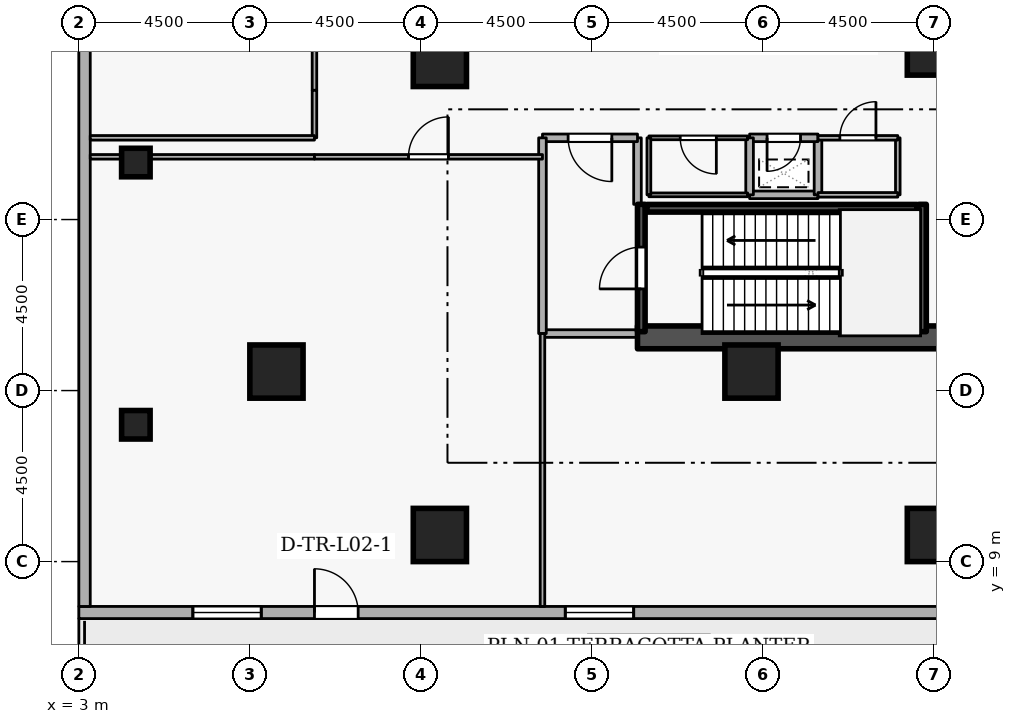
"""IFC4 building model, lengths in metres.
Left out: names, types, materials, properties, quantities, classifications, styles, units other than length and angle.
Written with IfcOpenShell. Run it as: python <this file> out.ifc"""

import sys

from ifc_helpers import new_model, si_unit, direction, frame, frame_2d, origin, origin_2d, place, context, subcontext, project, spatial, rectangle, extrude, element, fill, save


model = new_model("IFC4")
c1 = context("Model", 3, precision=1e-05, world=origin(), true_north=direction((0.0, 1.0)))
c2 = subcontext(c1, "Body", "Model", "MODEL_VIEW")
j1 = project(units=[si_unit("LENGTHUNIT", "METRE"), si_unit("PLANEANGLEUNIT", "RADIAN")], contexts=[c1])
p1 = place(None, origin())
s1 = spatial("IfcSite", under=j1, at=p1, CompositionType="ELEMENT")
p2 = place(p1, origin())
s2 = spatial("IfcBuilding", under=s1, at=p2, CompositionType="ELEMENT")
p3 = place(p2, frame((0.0, 0.0, 9.6)))
s3 = spatial("IfcBuildingStorey", under=s2, at=p3, CompositionType="ELEMENT", Elevation=9.6)
p4 = place(p3, frame((17.7, 14.9, 0.0), z_axis=(0.0, 0.0, 1.0), x_axis=(1.0, 0.0, 0.0)))
e1 = element("IfcWall", 1, at=p4, inside=s3, PredefinedType="SHEAR", context=c2, shape_type="SweptSolid", body=[
    extrude(rectangle(XDim=15.6, YDim=0.6, at=frame_2d((7.8, 0.0))), origin(), (0.0, 0.0, 1.0), 4.5),
])
for number, where, z_axis, x_axis in (
    (2, (12.5, 9.7, 0.0), (0.0, 0.0, 1.0), (1.0, 0.0, 0.0)),
    (3, (25.5, 9.7, 0.0), (0.0, 0.0, 1.0), (1.0, 0.0, 0.0)),
    (4, (8.2, 14.0, 0.0), (0.0, 0.0, 1.0), (1.0, 0.0, 0.0)),
    (5, (12.5, 22.2, 0.0), (0.0, 0.0, 1.0), (1.0, 0.0, 0.0)),
    (6, (20.7, 14.0, 0.0), (0.0, 0.0, 1.0), (1.0, 0.0, 0.0)),
    (7, (25.5, 22.5, 0.0), (0.0, 0.0, 1.0), (1.0, 0.0, 0.0)),
):
    element("IfcColumn", number, at=place(p3, frame(where, z_axis=z_axis, x_axis=x_axis)), inside=s3, PredefinedType="COLUMN", context=c2, shape_type="SweptSolid", body=[
        extrude(rectangle(XDim=1.4, YDim=1.4, at=origin_2d()), origin(), (0.0, 0.0, 1.0), 4.5),
    ])
for number, where, z_axis, x_axis in (
    (8, (4.5, 12.6, 0.0), (0.0, 0.0, 1.0), (1.0, 0.0, 0.0)),
    (9, (4.5, 19.5, 0.0), (0.0, 0.0, 1.0), (1.0, 0.0, 0.0)),
):
    element("IfcColumn", number, at=place(p3, frame(where, z_axis=z_axis, x_axis=x_axis)), inside=s3, PredefinedType="COLUMN", context=c2, shape_type="SweptSolid", body=[
        extrude(rectangle(XDim=0.75, YDim=0.75, at=origin_2d()), origin(), (0.0, 0.0, 1.0), 4.5),
    ])
p5 = place(p3, frame((3.0, 7.66, 0.0), z_axis=(0.0, 0.0, 1.0), x_axis=(1.0, 0.0, 0.0)))
e10 = element("IfcWall", 10, at=p5, inside=s3, PredefinedType="STANDARD", context=c2, shape_type="SweptSolid", body=[
    extrude(rectangle(XDim=39.4, YDim=0.32, at=frame_2d((19.7, 0.0))), origin(), (0.0, 0.0, 1.0), 3.56),
])
p6 = place(p5, frame((6.2, 0.0, 0.0)))
e11 = element("IfcOpeningElement", 11, at=p6, cuts=e10, PredefinedType="OPENING", context=c2, shape_type="SweptSolid", body=[
    extrude(rectangle(XDim=1.15, YDim=2.1, at=frame_2d((0.575, 1.05))), frame((0.0, 0.17, 0.0), z_axis=(0.0, -1.0, 0.0), x_axis=(1.0, 0.0, 0.0)), (0.0, 0.0, 1.0), 0.34),
])
p7 = place(p5, frame((3.0, 0.0, 0.78)))
e12 = element("IfcOpeningElement", 12, at=p7, cuts=e10, PredefinedType="OPENING", context=c2, shape_type="SweptSolid", body=[
    extrude(rectangle(XDim=1.8, YDim=2.15, at=frame_2d((0.9, 1.075))), frame((0.0, 0.17, 0.0), z_axis=(0.0, -1.0, 0.0), x_axis=(1.0, 0.0, 0.0)), (0.0, 0.0, 1.0), 0.34),
])
p8 = place(p5, frame((12.8, 0.0, 0.78)))
e13 = element("IfcOpeningElement", 13, at=p8, cuts=e10, PredefinedType="OPENING", context=c2, shape_type="SweptSolid", body=[
    extrude(rectangle(XDim=1.8, YDim=2.15, at=frame_2d((0.9, 1.075))), frame((0.0, 0.17, 0.0), z_axis=(0.0, -1.0, 0.0), x_axis=(1.0, 0.0, 0.0)), (0.0, 0.0, 1.0), 0.34),
])
p9 = place(p5, frame((32.8, 0.0, 0.78)))
e14 = element("IfcOpeningElement", 14, at=p9, cuts=e10, PredefinedType="OPENING", context=c2, shape_type="SweptSolid", body=[
    extrude(rectangle(XDim=1.8, YDim=2.15, at=frame_2d((0.9, 1.075))), frame((0.0, 0.17, 0.0), z_axis=(0.0, -1.0, 0.0), x_axis=(1.0, 0.0, 0.0)), (0.0, 0.0, 1.0), 0.34),
])
p10 = place(p3, frame((3.15, 49.18, 0.0), z_axis=(0.0, 0.0, 1.0), x_axis=(0.0, -1.0, 0.0)))
e15 = element("IfcWall", 15, at=p10, inside=s3, PredefinedType="STANDARD", context=c2, shape_type="SweptSolid", body=[
    extrude(rectangle(XDim=41.36, YDim=0.3, at=frame_2d((20.68, 0.0))), origin(), (0.0, 0.0, 1.0), 3.56),
])
p11 = place(p3, frame((17.8, 15.05, 0.0), z_axis=(0.0, 0.0, 1.0), x_axis=(0.0, 1.0, 0.0)))
e16 = element("IfcWall", 16, at=p11, inside=s3, PredefinedType="SHEAR", context=c2, shape_type="SweptSolid", body=[
    extrude(rectangle(XDim=3.35, YDim=0.2, at=frame_2d((1.675, 0.0))), origin(), (0.0, 0.0, 1.0), 4.5),
])
p12 = place(p11, frame((1.125, 0.0, 0.0)))
e17 = element("IfcOpeningElement", 17, at=p12, cuts=e16, PredefinedType="OPENING", context=c2, shape_type="SweptSolid", body=[
    extrude(rectangle(XDim=1.1, YDim=2.1, at=frame_2d((0.55, 1.05))), frame((0.0, 0.11, 0.0), z_axis=(0.0, -1.0, 0.0), x_axis=(1.0, 0.0, 0.0)), (0.0, 0.0, 1.0), 0.22),
])
p13 = place(p3, frame((25.2, 18.4, 0.0), z_axis=(0.0, 0.0, 1.0), x_axis=(0.0, -1.0, 0.0)))
e18 = element("IfcWall", 18, at=p13, inside=s3, PredefinedType="SHEAR", context=c2, shape_type="SweptSolid", body=[
    extrude(rectangle(XDim=3.35, YDim=0.2, at=frame_2d((1.675, 0.0))), origin(), (0.0, 0.0, 1.0), 4.5),
])
p14 = place(p3, frame((25.05, 18.297, 0.0), z_axis=(0.0, 0.0, 1.0), x_axis=(-1.0, 0.0, 0.0)))
e19 = element("IfcWall", 19, at=p14, inside=s3, PredefinedType="SHEAR", context=c2, shape_type="SweptSolid", body=[
    extrude(rectangle(XDim=7.1, YDim=0.2, at=frame_2d((3.55, 0.0))), origin(), (0.0, 0.0, 1.0), 4.5),
])
p15 = place(p3, frame((15.2, 15.0, 0.0), z_axis=(0.0, 0.0, 1.0), x_axis=(1.0, 0.0, 0.0)))
e20 = element("IfcWall", 20, at=p15, inside=s3, PredefinedType="STANDARD", context=c2, shape_type="SweptSolid", body=[
    extrude(rectangle(XDim=2.5, YDim=0.2, at=frame_2d((1.25, 0.0))), origin(), (0.0, 0.0, 1.0), 4.16),
])
p16 = place(p3, frame((17.7, 18.4, 0.0), z_axis=(0.0, 0.0, 1.0), x_axis=(0.0, 1.0, 0.0)))
e21 = element("IfcWall", 21, at=p16, inside=s3, PredefinedType="STANDARD", context=c2, shape_type="SweptSolid", body=[
    extrude(rectangle(XDim=1.75, YDim=0.2, at=frame_2d((0.875, 0.0))), origin(), (0.0, 0.0, 1.0), 3.365),
])
p17 = place(p3, frame((17.7, 20.15, 0.0), z_axis=(0.0, 0.0, 1.0), x_axis=(-1.0, 0.0, 0.0)))
e22 = element("IfcWall", 22, at=p17, inside=s3, PredefinedType="STANDARD", context=c2, shape_type="SweptSolid", body=[
    extrude(rectangle(XDim=2.5, YDim=0.2, at=frame_2d((1.25, 0.0))), origin(), (0.0, 0.0, 1.0), 4.16),
])
p18 = place(p17, frame((0.675, 0.0, 0.0)))
e23 = element("IfcOpeningElement", 23, at=p18, cuts=e22, PredefinedType="OPENING", context=c2, shape_type="SweptSolid", body=[
    extrude(rectangle(XDim=1.15, YDim=2.1, at=frame_2d((0.575, 1.05))), frame((0.0, 0.11, 0.0), z_axis=(0.0, -1.0, 0.0), x_axis=(1.0, 0.0, 0.0)), (0.0, 0.0, 1.0), 0.22),
])
p19 = place(p3, frame((15.2, 20.15, 0.0), z_axis=(0.0, 0.0, 1.0), x_axis=(0.0, -1.0, 0.0)))
e24 = element("IfcWall", 24, at=p19, inside=s3, PredefinedType="STANDARD", context=c2, shape_type="SweptSolid", body=[
    extrude(rectangle(XDim=5.15, YDim=0.2, at=frame_2d((2.575, 0.0))), origin(), (0.0, 0.0, 1.0), 4.16),
])
p20 = place(p3, frame((20.65, 18.65, 0.0), z_axis=(0.0, 0.0, 1.0), x_axis=(1.0, 0.0, 0.0)))
e25 = element("IfcWall", 25, at=p20, inside=s3, PredefinedType="STANDARD", context=c2, shape_type="SweptSolid", body=[
    extrude(rectangle(XDim=1.8, YDim=0.2, at=frame_2d((0.9, 0.0))), origin(), (0.0, 0.0, 1.0), 4.16),
])
p21 = place(p3, frame((22.45, 18.65, 0.0), z_axis=(0.0, 0.0, 1.0), x_axis=(0.0, 1.0, 0.0)))
e26 = element("IfcWall", 26, at=p21, inside=s3, PredefinedType="STANDARD", context=c2, shape_type="SweptSolid", body=[
    extrude(rectangle(XDim=1.5, YDim=0.2, at=frame_2d((0.75, 0.0))), origin(), (0.0, 0.0, 1.0), 4.16),
])
p22 = place(p3, frame((22.45, 20.15, 0.0), z_axis=(0.0, 0.0, 1.0), x_axis=(-1.0, 0.0, 0.0)))
e27 = element("IfcWall", 27, at=p22, inside=s3, PredefinedType="STANDARD", context=c2, shape_type="SweptSolid", body=[
    extrude(rectangle(XDim=1.8, YDim=0.2, at=frame_2d((0.9, 0.0))), origin(), (0.0, 0.0, 1.0), 4.16),
])
p23 = place(p22, frame((0.46, 0.0, 0.0)))
e28 = element("IfcOpeningElement", 28, at=p23, cuts=e27, PredefinedType="OPENING", context=c2, shape_type="SweptSolid", body=[
    extrude(rectangle(XDim=0.88, YDim=2.04, at=frame_2d((0.44, 1.02))), frame((0.0, 0.11, 0.0), z_axis=(0.0, -1.0, 0.0), x_axis=(1.0, 0.0, 0.0)), (0.0, 0.0, 1.0), 0.22),
])
p24 = place(p3, frame((20.65, 20.15, 0.0), z_axis=(0.0, 0.0, 1.0), x_axis=(0.0, -1.0, 0.0)))
e29 = element("IfcWall", 29, at=p24, inside=s3, PredefinedType="STANDARD", context=c2, shape_type="SweptSolid", body=[
    extrude(rectangle(XDim=1.5, YDim=0.2, at=frame_2d((0.75, 0.0))), origin(), (0.0, 0.0, 1.0), 4.16),
])
p25 = place(p3, frame((18.0, 18.65, 0.0), z_axis=(0.0, 0.0, 1.0), x_axis=(1.0, 0.0, 0.0)))
e30 = element("IfcWall", 30, at=p25, inside=s3, PredefinedType="PARTITIONING", context=c2, shape_type="SweptSolid", body=[
    extrude(rectangle(XDim=2.6, YDim=0.1, at=frame_2d((1.3, 0.0))), origin(), (0.0, 0.0, 1.0), 4.16),
])
p26 = place(p3, frame((20.6, 20.15, 0.0), z_axis=(0.0, 0.0, 1.0), x_axis=(-1.0, 0.0, 0.0)))
e31 = element("IfcWall", 31, at=p26, inside=s3, PredefinedType="PARTITIONING", context=c2, shape_type="SweptSolid", body=[
    extrude(rectangle(XDim=2.6, YDim=0.1, at=frame_2d((1.3, 0.0))), origin(), (0.0, 0.0, 1.0), 4.16),
])
p27 = place(p26, frame((0.825, 0.0, 0.0)))
e32 = element("IfcOpeningElement", 32, at=p27, cuts=e31, PredefinedType="OPENING", context=c2, shape_type="SweptSolid", body=[
    extrude(rectangle(XDim=0.95, YDim=2.1, at=frame_2d((0.475, 1.05))), frame((0.0, 0.06, 0.0), z_axis=(0.0, -1.0, 0.0), x_axis=(1.0, 0.0, 0.0)), (0.0, 0.0, 1.0), 0.12),
])
p28 = place(p3, frame((18.0, 20.15, 0.0), z_axis=(0.0, 0.0, 1.0), x_axis=(0.0, -1.0, 0.0)))
e33 = element("IfcWall", 33, at=p28, inside=s3, PredefinedType="PARTITIONING", context=c2, shape_type="SweptSolid", body=[
    extrude(rectangle(XDim=1.5, YDim=0.1, at=frame_2d((0.75, 0.0))), origin(), (0.0, 0.0, 1.0), 3.365),
])
p29 = place(p3, frame((24.55, 20.15, 0.0), z_axis=(0.0, 0.0, 1.0), x_axis=(0.0, -1.0, 0.0)))
e34 = element("IfcWall", 34, at=p29, inside=s3, PredefinedType="PARTITIONING", context=c2, shape_type="SweptSolid", body=[
    extrude(rectangle(XDim=1.5, YDim=0.12, at=frame_2d((0.75, 0.0))), origin(), (0.0, 0.0, 1.0), 4.16),
])
p30 = place(p3, frame((24.55, 18.65, 0.0), z_axis=(0.0, 0.0, 1.0), x_axis=(-1.0, 0.0, 0.0)))
e35 = element("IfcWall", 35, at=p30, inside=s3, PredefinedType="PARTITIONING", context=c2, shape_type="SweptSolid", body=[
    extrude(rectangle(XDim=2.1, YDim=0.12, at=frame_2d((1.05, 0.0))), origin(), (0.0, 0.0, 1.0), 4.16),
])
p31 = place(p3, frame((22.45, 20.15, 0.0), z_axis=(0.0, 0.0, 1.0), x_axis=(1.0, 0.0, 0.0)))
e36 = element("IfcWall", 36, at=p31, inside=s3, PredefinedType="PARTITIONING", context=c2, shape_type="SweptSolid", body=[
    extrude(rectangle(XDim=2.1, YDim=0.12, at=frame_2d((1.05, 0.0))), origin(), (0.0, 0.0, 1.0), 4.16),
])
p32 = place(p31, frame((0.575, 0.0, 0.0)))
e37 = element("IfcOpeningElement", 37, at=p32, cuts=e36, PredefinedType="OPENING", context=c2, shape_type="SweptSolid", body=[
    extrude(rectangle(XDim=0.95, YDim=2.1, at=frame_2d((0.475, 1.05))), frame((0.0, 0.07, 0.0), z_axis=(0.0, -1.0, 0.0), x_axis=(1.0, 0.0, 0.0)), (0.0, 0.0, 1.0), 0.14),
])
p33 = place(p3, frame((3.3, 19.65, 0.0), z_axis=(0.0, 0.0, 1.0), x_axis=(1.0, 0.0, 0.0)))
e38 = element("IfcWall", 38, at=p33, inside=s3, PredefinedType="PARTITIONING", context=c2, shape_type="SweptSolid", body=[
    extrude(rectangle(XDim=5.9, YDim=0.12, at=frame_2d((2.95, 0.0))), origin(), (0.0, 0.0, 1.0), 4.16),
])
p34 = place(p3, frame((9.2, 19.65, 0.0), z_axis=(0.0, 0.0, 1.0), x_axis=(1.0, 0.0, 0.0)))
e39 = element("IfcWall", 39, at=p34, inside=s3, PredefinedType="PARTITIONING", context=c2, shape_type="SweptSolid", body=[
    extrude(rectangle(XDim=6.0, YDim=0.12, at=frame_2d((3.0, 0.0))), origin(), (0.0, 0.0, 1.0), 4.16),
])
p35 = place(p34, frame((2.475, 0.0, 0.0)))
e40 = element("IfcOpeningElement", 40, at=p35, cuts=e39, PredefinedType="OPENING", context=c2, shape_type="SweptSolid", body=[
    extrude(rectangle(XDim=1.05, YDim=2.1, at=frame_2d((0.525, 1.05))), frame((0.0, 0.07, 0.0), z_axis=(0.0, -1.0, 0.0), x_axis=(1.0, 0.0, 0.0)), (0.0, 0.0, 1.0), 0.14),
])
p36 = place(p3, frame((15.2, 15.0, 0.0), z_axis=(0.0, 0.0, 1.0), x_axis=(0.0, -1.0, 0.0)))
e41 = element("IfcWall", 41, at=p36, inside=s3, PredefinedType="PARTITIONING", context=c2, shape_type="SweptSolid", body=[
    extrude(rectangle(XDim=7.18, YDim=0.12, at=frame_2d((3.59, 0.0))), origin(), (0.0, 0.0, 1.0), 4.16),
])
p37 = place(p3, frame((9.2, 33.85, 0.0), z_axis=(0.0, 0.0, 1.0), x_axis=(0.0, -1.0, 0.0)))
e42 = element("IfcWall", 42, at=p37, inside=s3, PredefinedType="PARTITIONING", context=c2, shape_type="SweptSolid", body=[
    extrude(rectangle(XDim=12.45, YDim=0.12, at=frame_2d((6.225, 0.0))), origin(), (0.0, 0.0, 1.0), 4.16),
])
p38 = place(p37, frame((4.82, 0.0, 0.0)))
e43 = element("IfcOpeningElement", 43, at=p38, cuts=e42, PredefinedType="OPENING", context=c2, shape_type="SweptSolid", body=[
    extrude(rectangle(XDim=1.05, YDim=2.1, at=frame_2d((0.525, 1.05))), frame((0.0, 0.07, 0.0), z_axis=(0.0, -1.0, 0.0), x_axis=(1.0, 0.0, 0.0)), (0.0, 0.0, 1.0), 0.14),
])
p39 = place(p3, frame((9.2, 21.4, 0.0), z_axis=(0.0, 0.0, 1.0), x_axis=(0.0, -1.0, 0.0)))
e44 = element("IfcWall", 44, at=p39, inside=s3, PredefinedType="PARTITIONING", context=c2, shape_type="SweptSolid", body=[
    extrude(rectangle(XDim=1.25, YDim=0.12, at=frame_2d((0.625, 0.0))), origin(), (0.0, 0.0, 1.0), 4.16),
])
p40 = place(p3, frame((9.2, 20.15, 0.0), z_axis=(0.0, 0.0, 1.0), x_axis=(-1.0, 0.0, 0.0)))
e45 = element("IfcWall", 45, at=p40, inside=s3, PredefinedType="PARTITIONING", context=c2, shape_type="SweptSolid", body=[
    extrude(rectangle(XDim=5.9, YDim=0.12, at=frame_2d((2.95, 0.0))), origin(), (0.0, 0.0, 1.0), 4.16),
])
p41 = place(p6, origin())
e46 = element("IfcDoor", 46, at=p41, inside=s3, OperationType="SINGLE_SWING_LEFT", PredefinedType="DOOR", context=c2, shape_type="SweptSolid", body=[
    extrude(rectangle(XDim=1.15, YDim=2.1, at=frame_2d((0.575, 1.05))), frame((0.0, 0.025, 0.0), z_axis=(0.0, -1.0, 0.0), x_axis=(1.0, 0.0, 0.0)), (0.0, 0.0, 1.0), 0.05),
])
fill(e11, e46)
p42 = place(p7, origin())
e47 = element("IfcWindow", 47, at=p42, inside=s3, PartitioningType="SINGLE_PANEL", PredefinedType="WINDOW", context=c2, shape_type="SweptSolid", body=[
    extrude(rectangle(XDim=1.8, YDim=2.15, at=frame_2d((0.9, 1.075))), frame((0.0, 0.03, 0.0), z_axis=(0.0, -1.0, 0.0), x_axis=(1.0, 0.0, 0.0)), (0.0, 0.0, 1.0), 0.06),
])
fill(e12, e47)
p43 = place(p8, origin())
e48 = element("IfcWindow", 48, at=p43, inside=s3, PartitioningType="SINGLE_PANEL", PredefinedType="WINDOW", context=c2, shape_type="SweptSolid", body=[
    extrude(rectangle(XDim=1.8, YDim=2.15, at=frame_2d((0.9, 1.075))), frame((0.0, 0.03, 0.0), z_axis=(0.0, -1.0, 0.0), x_axis=(1.0, 0.0, 0.0)), (0.0, 0.0, 1.0), 0.06),
])
fill(e13, e48)
p44 = place(p12, origin())
e49 = element("IfcDoor", 49, at=p44, inside=s3, OperationType="SINGLE_SWING_LEFT", PredefinedType="DOOR", context=c2, shape_type="SweptSolid", body=[
    extrude(rectangle(XDim=1.1, YDim=2.1, at=frame_2d((0.55, 1.05))), frame((0.0, 0.025, 0.0), z_axis=(0.0, -1.0, 0.0), x_axis=(1.0, 0.0, 0.0)), (0.0, 0.0, 1.0), 0.05),
])
fill(e17, e49)
p45 = place(p18, origin())
e50 = element("IfcDoor", 50, at=p45, inside=s3, OperationType="SINGLE_SWING_LEFT", PredefinedType="DOOR", context=c2, shape_type="SweptSolid", body=[
    extrude(rectangle(XDim=1.15, YDim=2.1, at=frame_2d((0.575, 1.05))), frame((0.0, 0.025, 0.0), z_axis=(0.0, -1.0, 0.0), x_axis=(1.0, 0.0, 0.0)), (0.0, 0.0, 1.0), 0.05),
])
fill(e23, e50)
p46 = place(p23, origin())
e51 = element("IfcDoor", 51, at=p46, inside=s3, OperationType="SINGLE_SWING_RIGHT", PredefinedType="DOOR", context=c2, shape_type="SweptSolid", body=[
    extrude(rectangle(XDim=0.88, YDim=2.04, at=frame_2d((0.44, 1.02))), frame((0.0, 0.025, 0.0), z_axis=(0.0, -1.0, 0.0), x_axis=(1.0, 0.0, 0.0)), (0.0, 0.0, 1.0), 0.05),
])
fill(e28, e51)
p47 = place(p27, origin())
e52 = element("IfcDoor", 52, at=p47, inside=s3, OperationType="SINGLE_SWING_LEFT", PredefinedType="DOOR", context=c2, shape_type="SweptSolid", body=[
    extrude(rectangle(XDim=0.95, YDim=2.1, at=frame_2d((0.475, 1.05))), frame((0.0, 0.025, 0.0), z_axis=(0.0, -1.0, 0.0), x_axis=(1.0, 0.0, 0.0)), (0.0, 0.0, 1.0), 0.05),
])
fill(e32, e52)
p48 = place(p32, origin())
e53 = element("IfcDoor", 53, at=p48, inside=s3, OperationType="SINGLE_SWING_RIGHT", PredefinedType="DOOR", context=c2, shape_type="SweptSolid", body=[
    extrude(rectangle(XDim=0.95, YDim=2.1, at=frame_2d((0.475, 1.05))), frame((0.0, 0.025, 0.0), z_axis=(0.0, -1.0, 0.0), x_axis=(1.0, 0.0, 0.0)), (0.0, 0.0, 1.0), 0.05),
])
fill(e37, e53)
p49 = place(p35, origin())
e54 = element("IfcDoor", 54, at=p49, inside=s3, OperationType="SINGLE_SWING_RIGHT", PredefinedType="DOOR", context=c2, shape_type="SweptSolid", body=[
    extrude(rectangle(XDim=1.05, YDim=2.1, at=frame_2d((0.525, 1.05))), frame((0.0, 0.025, 0.0), z_axis=(0.0, -1.0, 0.0), x_axis=(1.0, 0.0, 0.0)), (0.0, 0.0, 1.0), 0.05),
])
fill(e40, e54)
save(model, sys.argv[1])
